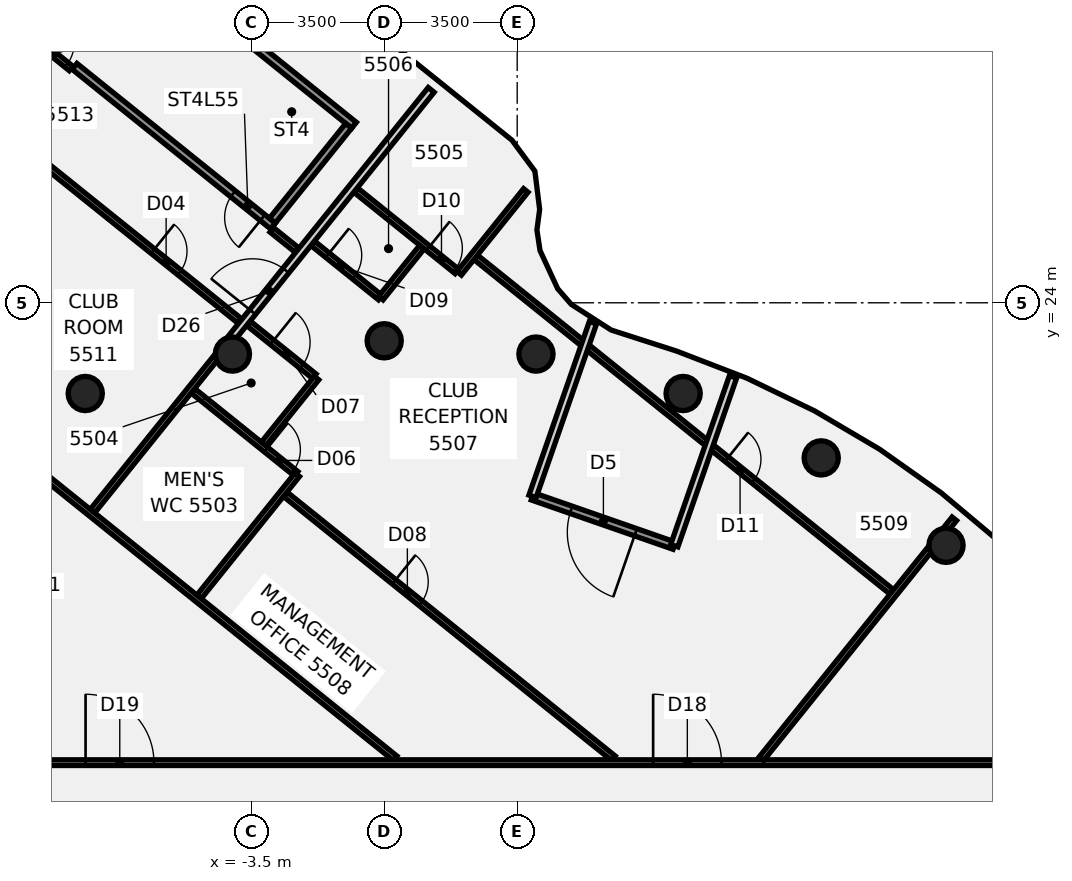
"""IFC4 building model, lengths in metres.
Left out: names, types, materials, properties, quantities, classifications, styles, units other than length and angle.
Written with IfcOpenShell. Run it as: python <this file> out.ifc"""

import sys

from ifc_helpers import new_model, si_unit, direction, frame, frame_2d, origin, origin_2d, place, context, subcontext, project, spatial, polyline, rectangle, circle, outline, extrude, element, fill, save


model = new_model("IFC4")
c1 = context("Model", 3, precision=1e-05, world=origin(), true_north=direction((0.0, 1.0)))
c2 = subcontext(c1, "Body", "Model", "MODEL_VIEW")
j1 = project(units=[si_unit("LENGTHUNIT", "METRE"), si_unit("PLANEANGLEUNIT", "RADIAN")], contexts=[c1])
p1 = place(None, origin())
s1 = spatial("IfcSite", under=j1, at=p1, CompositionType="ELEMENT")
p2 = place(p1, origin())
s2 = spatial("IfcBuilding", under=s1, at=p2, CompositionType="ELEMENT")
p3 = place(p2, frame((0.0, 0.0, 219.9)))
s3 = spatial("IfcBuildingStorey", under=s2, at=p3, CompositionType="ELEMENT", Elevation=219.9)
for number, where, z_axis, x_axis in (
    (1, (14.784, 17.619, -0.14), (0.0, 0.0, 1.0), (1.0, 0.0, 0.0)),
    (2, (11.5, 19.919, -0.14), (0.0, 0.0, 1.0), (1.0, 0.0, 0.0)),
    (3, (7.866, 21.613, -0.14), (0.0, 0.0, 1.0), (1.0, 0.0, 0.0)),
    (4, (3.994, 22.651, -0.14), (0.0, 0.0, 1.0), (1.0, 0.0, 0.0)),
    (5, (0.0, 23.0, -0.14), (0.0, 0.0, 1.0), (1.0, 0.0, 0.0)),
    (6, (-3.994, 22.651, -0.14), (0.0, 0.0, 1.0), (1.0, 0.0, 0.0)),
    (7, (-7.866, 21.613, -0.14), (0.0, 0.0, 1.0), (1.0, 0.0, 0.0)),
):
    element("IfcColumn", number, at=place(p3, frame(where, z_axis=z_axis, x_axis=x_axis)), inside=s3, PredefinedType="COLUMN", context=c2, shape_type="SweptSolid", body=[
        extrude(circle(Radius=0.45, at=origin_2d()), origin(), (0.0, 0.0, 1.0), 3.6),
    ])
p4 = place(p3, frame((-12.665, 22.432, 0.0), z_axis=(0.0, 0.0, 1.0), x_axis=(0.779284245227, -0.626670619338, 0.0)))
e8 = element("IfcWall", 8, at=p4, inside=s3, PredefinedType="PARTITIONING", context=c2, shape_type="SweptSolid", body=[
    extrude(rectangle(XDim=16.621, YDim=0.15, at=frame_2d((8.311, 0.0))), origin(), (0.0, 0.0, 1.0), 2.864),
])
p5 = place(p3, frame((-10.665, 29.036, 0.0), z_axis=(0.0, 0.0, 1.0), x_axis=(0.779529978914, -0.626364919176, 0.0)))
e9 = element("IfcWall", 9, at=p5, inside=s3, PredefinedType="PARTITIONING", context=c2, shape_type="SweptSolid", body=[
    extrude(rectangle(XDim=8.8, YDim=0.15, at=frame_2d((4.4, 0.0))), origin(), (0.0, 0.0, 1.0), 2.864),
])
p6 = place(p5, frame((5.87, 0.0, 0.0)))
e10 = element("IfcOpeningElement", 10, at=p6, cuts=e9, PredefinedType="OPENING", context=c2, shape_type="SweptSolid", body=[
    extrude(rectangle(XDim=0.9, YDim=2.1, at=frame_2d((0.45, 1.05))), frame((0.0, 0.085, 0.0), z_axis=(0.0, -1.0, 0.0), x_axis=(1.0, 0.0, 0.0)), (0.0, 0.0, 1.0), 0.17),
])
p7 = place(p3, frame((-9.161, 30.907, 0.0), z_axis=(0.0, 0.0, 1.0), x_axis=(0.779191494895, -0.626785939763, 0.0)))
e11 = element("IfcWall", 11, at=p7, inside=s3, PredefinedType="PARTITIONING", context=c2, shape_type="SweptSolid", body=[
    extrude(rectangle(XDim=1.181, YDim=0.15, at=frame_2d((0.59, 0.0))), origin(), (0.0, 0.0, 1.0), 2.864),
])
p8 = place(p7, frame((0.131, 0.0, 0.0)))
e12 = element("IfcOpeningElement", 12, at=p8, cuts=e11, PredefinedType="OPENING", context=c2, shape_type="SweptSolid", body=[
    extrude(rectangle(XDim=0.9, YDim=2.1, at=frame_2d((0.45, 1.05))), frame((0.0, 0.085, 0.0), z_axis=(0.0, -1.0, 0.0), x_axis=(1.0, 0.0, 0.0)), (0.0, 0.0, 1.0), 0.17),
])
p9 = place(p3, frame((-2.958, 25.918, 0.0), z_axis=(0.0, 0.0, 1.0), x_axis=(0.77922270064, -0.626747144235, 0.0)))
e13 = element("IfcWall", 13, at=p9, inside=s3, PredefinedType="PARTITIONING", context=c2, shape_type="SweptSolid", body=[
    extrude(rectangle(XDim=0.841, YDim=0.15, at=frame_2d((0.42, 0.0))), origin(), (0.0, 0.0, 1.0), 2.864),
])
p10 = place(p3, frame((-5.03, 21.682, 0.0), z_axis=(0.0, 0.0, 1.0), x_axis=(0.779278251962, -0.626678072074, 0.0)))
e14 = element("IfcWall", 14, at=p10, inside=s3, PredefinedType="PARTITIONING", context=c2, shape_type="SweptSolid", body=[
    extrude(rectangle(XDim=3.48, YDim=0.15, at=frame_2d((1.74, 0.0))), origin(), (0.0, 0.0, 1.0), 2.864),
])
p11 = place(p10, frame((2.47, 0.0, 0.0)))
e15 = element("IfcOpeningElement", 15, at=p11, cuts=e14, PredefinedType="OPENING", context=c2, shape_type="SweptSolid", body=[
    extrude(rectangle(XDim=0.9, YDim=2.1, at=frame_2d((0.45, 1.05))), frame((0.0, 0.085, 0.0), z_axis=(0.0, -1.0, 0.0), x_axis=(1.0, 0.0, 0.0)), (0.0, 0.0, 1.0), 0.17),
])
p12 = place(p3, frame((-3.558, 23.449, 0.0), z_axis=(0.0, 0.0, 1.0), x_axis=(0.779441374228, -0.626475174401, 0.0)))
e16 = element("IfcWall", 16, at=p12, inside=s3, PredefinedType="PARTITIONING", context=c2, shape_type="SweptSolid", body=[
    extrude(rectangle(XDim=2.206, YDim=0.15, at=frame_2d((1.103, 0.0))), origin(), (0.0, 0.0, 1.0), 2.864),
])
p13 = place(p12, frame((0.78, 0.0, 0.0)))
e17 = element("IfcOpeningElement", 17, at=p13, cuts=e16, PredefinedType="OPENING", context=c2, shape_type="SweptSolid", body=[
    extrude(rectangle(XDim=1.0, YDim=2.1, at=frame_2d((0.5, 1.05))), frame((0.0, 0.085, 0.0), z_axis=(0.0, -1.0, 0.0), x_axis=(1.0, 0.0, 0.0)), (0.0, 0.0, 1.0), 0.17),
])
p14 = place(p3, frame((-2.601, 18.959, 0.0), z_axis=(0.0, 0.0, 1.0), x_axis=(0.779260240467, -0.626700468826, 0.0)))
e18 = element("IfcWall", 18, at=p14, inside=s3, PredefinedType="PARTITIONING", context=c2, shape_type="SweptSolid", body=[
    extrude(rectangle(XDim=11.079, YDim=0.15, at=frame_2d((5.54, 0.0))), origin(), (0.0, 0.0, 1.0), 2.864),
])
p15 = place(p14, frame((3.67, 0.0, 0.0)))
e19 = element("IfcOpeningElement", 19, at=p15, cuts=e18, PredefinedType="OPENING", context=c2, shape_type="SweptSolid", body=[
    extrude(rectangle(XDim=0.9, YDim=2.1, at=frame_2d((0.45, 1.05))), frame((0.0, 0.085, 0.0), z_axis=(0.0, -1.0, 0.0), x_axis=(1.0, 0.0, 0.0)), (0.0, 0.0, 1.0), 0.17),
])
p16 = place(p3, frame((-1.881, 25.565, 0.0), z_axis=(0.0, 0.0, 1.0), x_axis=(0.779446392233, -0.626468931101, 0.0)))
e20 = element("IfcWall", 20, at=p16, inside=s3, PredefinedType="PARTITIONING", context=c2, shape_type="SweptSolid", body=[
    extrude(rectangle(XDim=2.281, YDim=0.15, at=frame_2d((1.14, 0.0))), origin(), (0.0, 0.0, 1.0), 2.864),
])
p17 = place(p16, frame((0.5, 0.0, 0.0)))
e21 = element("IfcOpeningElement", 21, at=p17, cuts=e20, PredefinedType="OPENING", context=c2, shape_type="SweptSolid", body=[
    extrude(rectangle(XDim=0.9, YDim=2.1, at=frame_2d((0.45, 1.05))), frame((0.0, 0.085, 0.0), z_axis=(0.0, -1.0, 0.0), x_axis=(1.0, 0.0, 0.0)), (0.0, 0.0, 1.0), 0.17),
])
p18 = place(p3, frame((-0.738, 26.956, 0.0), z_axis=(0.0, 0.0, 1.0), x_axis=(0.779423789997, -0.626497051539, 0.0)))
e22 = element("IfcWall", 22, at=p18, inside=s3, PredefinedType="PARTITIONING", context=c2, shape_type="SweptSolid", body=[
    extrude(rectangle(XDim=3.4, YDim=0.15, at=frame_2d((1.7, 0.0))), origin(), (0.0, 0.0, 1.0), 2.864),
])
p19 = place(p18, frame((2.43, 0.0, 0.0)))
e23 = element("IfcOpeningElement", 23, at=p19, cuts=e22, PredefinedType="OPENING", context=c2, shape_type="SweptSolid", body=[
    extrude(rectangle(XDim=0.9, YDim=2.1, at=frame_2d((0.45, 1.05))), frame((0.0, 0.085, 0.0), z_axis=(0.0, -1.0, 0.0), x_axis=(1.0, 0.0, 0.0)), (0.0, 0.0, 1.0), 0.17),
])
p20 = place(p3, frame((2.413, 25.192, 0.0), z_axis=(0.0, 0.0, 1.0), x_axis=(0.779312396621, -0.6266356106, 0.0)))
e24 = element("IfcWall", 24, at=p20, inside=s3, PredefinedType="PARTITIONING", context=c2, shape_type="SweptSolid", body=[
    extrude(rectangle(XDim=14.04, YDim=0.15, at=frame_2d((7.02, 0.0))), origin(), (0.0, 0.0, 1.0), 2.864),
])
p21 = place(p20, frame((8.47, 0.0, 0.0)))
e25 = element("IfcOpeningElement", 25, at=p21, cuts=e24, PredefinedType="OPENING", context=c2, shape_type="SweptSolid", body=[
    extrude(rectangle(XDim=0.9, YDim=2.1, at=frame_2d((0.45, 1.05))), frame((0.0, 0.085, 0.0), z_axis=(0.0, -1.0, 0.0), x_axis=(1.0, 0.0, 0.0)), (0.0, 0.0, 1.0), 0.17),
])
p22 = place(p3, frame((-17.065, 11.9, 0.0), z_axis=(0.0, 0.0, 1.0), x_axis=(1.0, 0.0, 0.0)))
e26 = element("IfcWall", 26, at=p22, inside=s3, PredefinedType="PARTITIONING", context=c2, shape_type="SweptSolid", body=[
    extrude(rectangle(XDim=34.165, YDim=0.15, at=frame_2d((17.083, 0.0))), origin(), (0.0, 0.0, 1.0), 2.864),
])
p23 = place(p22, frame((24.142, 0.0, 0.0)))
e27 = element("IfcOpeningElement", 27, at=p23, cuts=e26, PredefinedType="OPENING", context=c2, shape_type="SweptSolid", body=[
    extrude(rectangle(XDim=1.8, YDim=2.1, at=frame_2d((0.9, 1.05))), frame((0.0, 0.085, 0.0), z_axis=(0.0, -1.0, 0.0), x_axis=(1.0, 0.0, 0.0)), (0.0, 0.0, 1.0), 0.17),
])
p24 = place(p22, frame((9.207, 0.0, 0.0)))
e28 = element("IfcOpeningElement", 28, at=p24, cuts=e26, PredefinedType="OPENING", context=c2, shape_type="SweptSolid", body=[
    extrude(rectangle(XDim=1.8, YDim=2.1, at=frame_2d((0.9, 1.05))), frame((0.0, 0.085, 0.0), z_axis=(0.0, -1.0, 0.0), x_axis=(1.0, 0.0, 0.0)), (0.0, 0.0, 1.0), 0.17),
])
p25 = place(p22, frame((2.757, 0.0, 0.0)))
e29 = element("IfcOpeningElement", 29, at=p25, cuts=e26, PredefinedType="OPENING", context=c2, shape_type="SweptSolid", body=[
    extrude(rectangle(XDim=1.8, YDim=2.1, at=frame_2d((0.9, 1.05))), frame((0.0, 0.085, 0.0), z_axis=(0.0, -1.0, 0.0), x_axis=(1.0, 0.0, 0.0)), (0.0, 0.0, 1.0), 0.17),
])
p26 = place(p3, frame((-14.188, 24.782, 0.0), z_axis=(0.0, 0.0, 1.0), x_axis=(0.626733675184, 0.779233533923, 0.0)))
e30 = element("IfcWall", 30, at=p26, inside=s3, PredefinedType="PARTITIONING", context=c2, shape_type="SweptSolid", body=[
    extrude(rectangle(XDim=13.422, YDim=0.15, at=frame_2d((6.711, 0.0))), origin(), (0.0, 0.0, 1.0), 2.864),
])
p27 = place(p26, frame((5.823, 0.0, 0.0)))
e31 = element("IfcOpeningElement", 31, at=p27, cuts=e30, PredefinedType="OPENING", context=c2, shape_type="SweptSolid", body=[
    extrude(rectangle(XDim=1.8, YDim=2.1, at=frame_2d((0.9, 1.05))), frame((0.0, 0.085, 0.0), z_axis=(0.0, -1.0, 0.0), x_axis=(1.0, 0.0, 0.0)), (0.0, 0.0, 1.0), 0.17),
])
p28 = place(p3, frame((-7.674, 18.521, 0.0), z_axis=(0.0, 0.0, 1.0), x_axis=(0.626662098772, 0.779291097064, 0.0)))
e32 = element("IfcWall", 32, at=p28, inside=s3, PredefinedType="PARTITIONING", context=c2, shape_type="SweptSolid", body=[
    extrude(rectangle(XDim=5.307, YDim=0.15, at=frame_2d((2.654, 0.0))), origin(), (0.0, 0.0, 1.0), 2.864),
])
p29 = place(p3, frame((-4.066, 23.008, 0.0), z_axis=(0.0, 0.0, 1.0), x_axis=(0.62666000118, 0.779292783824, 0.0)))
e33 = element("IfcWall", 33, at=p29, inside=s3, PredefinedType="PARTITIONING", context=c2, shape_type="SweptSolid", body=[
    extrude(rectangle(XDim=8.461, YDim=0.2, at=frame_2d((4.231, 0.0))), origin(), (0.0, 0.0, 1.0), 2.864),
])
p30 = place(p29, frame((0.962, 0.0, 0.0)))
e34 = element("IfcOpeningElement", 34, at=p30, cuts=e33, PredefinedType="OPENING", context=c2, shape_type="SweptSolid", body=[
    extrude(rectangle(XDim=1.4, YDim=2.1, at=frame_2d((0.7, 1.05))), frame((0.0, 0.11, 0.0), z_axis=(0.0, -1.0, 0.0), x_axis=(1.0, 0.0, 0.0)), (0.0, 0.0, 1.0), 0.22),
])
p31 = place(p3, frame((-4.869, 16.265, 0.0), z_axis=(0.0, 0.0, 1.0), x_axis=(0.626586553854, 0.779351840012, 0.0)))
e35 = element("IfcWall", 35, at=p31, inside=s3, PredefinedType="PARTITIONING", context=c2, shape_type="SweptSolid", body=[
    extrude(rectangle(XDim=4.12, YDim=0.15, at=frame_2d((2.06, 0.0))), origin(), (0.0, 0.0, 1.0), 2.864),
])
p32 = place(p3, frame((1.974, 24.776, 0.0), z_axis=(0.0, 0.0, 1.0), x_axis=(0.626641118129, 0.779307968053, 0.0)))
e36 = element("IfcWall", 36, at=p32, inside=s3, PredefinedType="PARTITIONING", context=c2, shape_type="SweptSolid", body=[
    extrude(rectangle(XDim=2.797, YDim=0.15, at=frame_2d((1.398, 0.0))), origin(), (0.0, 0.0, 1.0), 2.864),
])
p33 = place(p3, frame((-3.172, 20.29, 0.0), z_axis=(0.0, 0.0, 1.0), x_axis=(0.626905231465, 0.779095520949, 0.0)))
e37 = element("IfcWall", 37, at=p33, inside=s3, PredefinedType="PARTITIONING", context=c2, shape_type="SweptSolid", body=[
    extrude(rectangle(XDim=2.22, YDim=0.15, at=frame_2d((1.11, 0.0))), origin(), (0.0, 0.0, 1.0), 2.864),
])
p34 = place(p3, frame((-0.087, 24.124, 0.0), z_axis=(0.0, 0.0, 1.0), x_axis=(0.62701150586, 0.779009994492, 0.0)))
e38 = element("IfcWall", 38, at=p34, inside=s3, PredefinedType="PARTITIONING", context=c2, shape_type="SweptSolid", body=[
    extrude(rectangle(XDim=1.72, YDim=0.15, at=frame_2d((0.86, 0.0))), origin(), (0.0, 0.0, 1.0), 2.864),
])
p35 = place(p3, frame((9.927, 12.005, 0.0), z_axis=(0.0, 0.0, 1.0), x_axis=(0.626707997456, 0.779254185696, 0.0)))
e39 = element("IfcWall", 39, at=p35, inside=s3, PredefinedType="PARTITIONING", context=c2, shape_type="SweptSolid", body=[
    extrude(rectangle(XDim=7.063, YDim=0.15, at=frame_2d((3.531, 0.0))), origin(), (0.0, 0.0, 1.0), 2.864),
])
p36 = place(p3, frame((14.807, 18.073, 0.0), z_axis=(0.0, 0.0, 1.0), x_axis=(0.626696680014, 0.779263287509, 0.0)))
e40 = element("IfcWall", 40, at=p36, inside=s3, PredefinedType="PARTITIONING", context=c2, shape_type="SweptSolid", body=[
    extrude(rectangle(XDim=0.312, YDim=0.15, at=frame_2d((0.156, 0.0))), origin(), (0.0, 0.0, 1.0), 2.864),
])
p37 = place(p3, frame((7.634, 17.608, 0.0), z_axis=(0.0, 0.0, 1.0), x_axis=(-0.944480118934, 0.328568569613, 0.0)))
e41 = element("IfcWall", 41, at=p37, inside=s3, PredefinedType="SOLIDWALL", context=c2, shape_type="SweptSolid", body=[
    extrude(rectangle(XDim=3.95, YDim=0.2, at=frame_2d((1.975, 0.0))), origin(), (0.0, 0.0, 1.0), 2.964),
])
p38 = place(p37, frame((1.075, 0.0, 0.0)))
e42 = element("IfcOpeningElement", 42, at=p38, cuts=e41, PredefinedType="OPENING", context=c2, shape_type="SweptSolid", body=[
    extrude(rectangle(XDim=1.8, YDim=2.4, at=frame_2d((0.9, 1.2))), frame((0.0, 0.11, 0.0), z_axis=(0.0, -1.0, 0.0), x_axis=(1.0, 0.0, 0.0)), (0.0, 0.0, 1.0), 0.22),
])
p39 = place(p3, frame((7.634, 17.608, 0.0), z_axis=(0.0, 0.0, 1.0), x_axis=(0.328583047261, 0.944475082283, 0.0)))
e43 = element("IfcWall", 43, at=p39, inside=s3, PredefinedType="SOLIDWALL", context=c2, shape_type="SweptSolid", body=[
    extrude(rectangle(XDim=4.702, YDim=0.2, at=frame_2d((2.351, 0.0))), origin(), (0.0, 0.0, 1.0), 3.46),
])
p40 = place(p3, frame((3.903, 18.906, 0.0), z_axis=(0.0, 0.0, 1.0), x_axis=(0.328583250144, 0.9444750117, 0.0)))
e44 = element("IfcWall", 44, at=p40, inside=s3, PredefinedType="SOLIDWALL", context=c2, shape_type="SweptSolid", body=[
    extrude(rectangle(XDim=4.838, YDim=0.2, at=frame_2d((2.419, 0.0))), origin(), (0.0, 0.0, 1.0), 2.964),
])
p41 = place(p3, frame((-2.926, 26.021, -0.14), z_axis=(0.0, 0.0, 1.0), x_axis=(-0.779295070633, 0.626657157373, 0.0)))
e45 = element("IfcWall", 45, at=p41, inside=s3, PredefinedType="SHEAR", context=c2, shape_type="SweptSolid", body=[
    extrude(rectangle(XDim=6.7, YDim=0.2, at=frame_2d((3.35, 0.0))), origin(), (0.0, 0.0, 1.0), 3.004),
])
p42 = place(p41, frame((0.35, 0.0, 0.0)))
e46 = element("IfcOpeningElement", 46, at=p42, cuts=e45, PredefinedType="OPENING", context=c2, shape_type="SweptSolid", body=[
    extrude(rectangle(XDim=1.0, YDim=2.1, at=frame_2d((0.5, 1.05))), frame((0.0, 0.11, 0.0), z_axis=(0.0, -1.0, 0.0), x_axis=(1.0, 0.0, 0.0)), (0.0, 0.0, 1.0), 0.22),
])
p43 = place(p3, frame((-0.795, 28.671, -0.14), z_axis=(0.0, 0.0, 1.0), x_axis=(-0.779280760932, 0.626674952142, 0.0)))
e47 = element("IfcWall", 47, at=p43, inside=s3, PredefinedType="SHEAR", context=c2, shape_type="SweptSolid", body=[
    extrude(rectangle(XDim=6.7, YDim=0.2, at=frame_2d((3.35, 0.0))), origin(), (0.0, 0.0, 1.0), 3.004),
])
p44 = place(p3, frame((-0.936, 28.656, -0.14), z_axis=(0.0, 0.0, 1.0), x_axis=(-0.626646862977, -0.779303348589, 0.0)))
e48 = element("IfcWall", 48, at=p44, inside=s3, PredefinedType="SHEAR", context=c2, shape_type="SweptSolid", body=[
    extrude(rectangle(XDim=3.2, YDim=0.2, at=frame_2d((1.6, 0.0))), origin(), (0.0, 0.0, 1.0), 3.6),
])
p45 = place(p3, frame((0.0, 0.0, -0.14)))
e49 = element("IfcWall", 49, at=p45, inside=s3, PredefinedType="SHEAR", context=c2, shape_type="SweptSolid", body=[
    extrude(outline(polyline([(-5.923, 32.666), (-6.079, 32.792), (-8.084, 30.298), (-7.929, 30.172), (-5.923, 32.666)])), origin(), (0.0, 0.0, 1.0), 3.004),
])
p46 = place(p6, frame((0.9, 0.0, 0.0), z_axis=(0.0, 0.0, 1.0), x_axis=(-1.0, 0.0, 0.0)))
e50 = element("IfcDoor", 50, at=p46, inside=s3, OperationType="SINGLE_SWING_RIGHT", PredefinedType="DOOR", context=c2, shape_type="SweptSolid", body=[
    extrude(rectangle(XDim=0.9, YDim=2.1, at=frame_2d((0.45, 1.05))), frame((0.0, 0.025, 0.0), z_axis=(0.0, -1.0, 0.0), x_axis=(1.0, 0.0, 0.0)), (0.0, 0.0, 1.0), 0.05),
])
fill(e10, e50)
p47 = place(p8, origin())
e51 = element("IfcDoor", 51, at=p47, inside=s3, OperationType="SINGLE_SWING_RIGHT", PredefinedType="DOOR", context=c2, shape_type="SweptSolid", body=[
    extrude(rectangle(XDim=0.9, YDim=2.1, at=frame_2d((0.45, 1.05))), frame((0.0, 0.025, 0.0), z_axis=(0.0, -1.0, 0.0), x_axis=(1.0, 0.0, 0.0)), (0.0, 0.0, 1.0), 0.05),
])
fill(e12, e51)
p48 = place(p11, frame((0.9, 0.0, 0.0), z_axis=(0.0, 0.0, 1.0), x_axis=(-1.0, 0.0, 0.0)))
e52 = element("IfcDoor", 52, at=p48, inside=s3, OperationType="SINGLE_SWING_RIGHT", PredefinedType="DOOR", context=c2, shape_type="SweptSolid", body=[
    extrude(rectangle(XDim=0.9, YDim=2.1, at=frame_2d((0.45, 1.05))), frame((0.0, 0.025, 0.0), z_axis=(0.0, -1.0, 0.0), x_axis=(1.0, 0.0, 0.0)), (0.0, 0.0, 1.0), 0.05),
])
fill(e15, e52)
p49 = place(p13, frame((1.0, 0.0, 0.0), z_axis=(0.0, 0.0, 1.0), x_axis=(-1.0, 0.0, 0.0)))
e53 = element("IfcDoor", 53, at=p49, inside=s3, OperationType="SINGLE_SWING_RIGHT", PredefinedType="DOOR", context=c2, shape_type="SweptSolid", body=[
    extrude(rectangle(XDim=1.0, YDim=2.1, at=frame_2d((0.5, 1.05))), frame((0.0, 0.025, 0.0), z_axis=(0.0, -1.0, 0.0), x_axis=(1.0, 0.0, 0.0)), (0.0, 0.0, 1.0), 0.05),
])
fill(e17, e53)
p50 = place(p15, frame((0.9, 0.0, 0.0), z_axis=(0.0, 0.0, 1.0), x_axis=(-1.0, 0.0, 0.0)))
e54 = element("IfcDoor", 54, at=p50, inside=s3, OperationType="SINGLE_SWING_LEFT", PredefinedType="DOOR", context=c2, shape_type="SweptSolid", body=[
    extrude(rectangle(XDim=0.9, YDim=2.1, at=frame_2d((0.45, 1.05))), frame((0.0, 0.025, 0.0), z_axis=(0.0, -1.0, 0.0), x_axis=(1.0, 0.0, 0.0)), (0.0, 0.0, 1.0), 0.05),
])
fill(e19, e54)
p51 = place(p17, origin())
e55 = element("IfcDoor", 55, at=p51, inside=s3, OperationType="SINGLE_SWING_RIGHT", PredefinedType="DOOR", context=c2, shape_type="SweptSolid", body=[
    extrude(rectangle(XDim=0.9, YDim=2.1, at=frame_2d((0.45, 1.05))), frame((0.0, 0.025, 0.0), z_axis=(0.0, -1.0, 0.0), x_axis=(1.0, 0.0, 0.0)), (0.0, 0.0, 1.0), 0.05),
])
fill(e21, e55)
p52 = place(p19, origin())
e56 = element("IfcDoor", 56, at=p52, inside=s3, OperationType="SINGLE_SWING_LEFT", PredefinedType="DOOR", context=c2, shape_type="SweptSolid", body=[
    extrude(rectangle(XDim=0.9, YDim=2.1, at=frame_2d((0.45, 1.05))), frame((0.0, 0.025, 0.0), z_axis=(0.0, -1.0, 0.0), x_axis=(1.0, 0.0, 0.0)), (0.0, 0.0, 1.0), 0.05),
])
fill(e23, e56)
p53 = place(p21, origin())
e57 = element("IfcDoor", 57, at=p53, inside=s3, OperationType="SINGLE_SWING_LEFT", PredefinedType="DOOR", context=c2, shape_type="SweptSolid", body=[
    extrude(rectangle(XDim=0.9, YDim=2.1, at=frame_2d((0.45, 1.05))), frame((0.0, 0.025, 0.0), z_axis=(0.0, -1.0, 0.0), x_axis=(1.0, 0.0, 0.0)), (0.0, 0.0, 1.0), 0.05),
])
fill(e25, e57)
p54 = place(p23, frame((1.8, 0.0, 0.0), z_axis=(0.0, 0.0, 1.0), x_axis=(-1.0, 0.0, 0.0)))
e58 = element("IfcDoor", 58, at=p54, inside=s3, OperationType="DOUBLE_DOOR_SINGLE_SWING", PredefinedType="DOOR", context=c2, shape_type="SweptSolid", body=[
    extrude(rectangle(XDim=1.8, YDim=2.1, at=frame_2d((0.9, 1.05))), frame((0.0, 0.025, 0.0), z_axis=(0.0, -1.0, 0.0), x_axis=(1.0, 0.0, 0.0)), (0.0, 0.0, 1.0), 0.05),
])
fill(e27, e58)
p55 = place(p24, origin())
e59 = element("IfcDoor", 59, at=p55, inside=s3, OperationType="DOUBLE_DOOR_SINGLE_SWING", PredefinedType="DOOR", context=c2, shape_type="SweptSolid", body=[
    extrude(rectangle(XDim=1.8, YDim=2.1, at=frame_2d((0.9, 1.05))), frame((0.0, 0.025, 0.0), z_axis=(0.0, -1.0, 0.0), x_axis=(1.0, 0.0, 0.0)), (0.0, 0.0, 1.0), 0.05),
])
fill(e28, e59)
p56 = place(p30, frame((1.4, 0.0, 0.0), z_axis=(0.0, 0.0, 1.0), x_axis=(-1.0, 0.0, 0.0)))
e60 = element("IfcDoor", 60, at=p56, inside=s3, OperationType="DOUBLE_DOOR_SINGLE_SWING", PredefinedType="DOOR", context=c2, shape_type="SweptSolid", body=[
    extrude(rectangle(XDim=1.4, YDim=2.1, at=frame_2d((0.7, 1.05))), frame((0.0, 0.025, 0.0), z_axis=(0.0, -1.0, 0.0), x_axis=(1.0, 0.0, 0.0)), (0.0, 0.0, 1.0), 0.05),
])
fill(e34, e60)
p57 = place(p38, origin())
e61 = element("IfcDoor", 61, at=p57, inside=s3, OperationType="SINGLE_SWING_LEFT", PredefinedType="DOOR", context=c2, shape_type="SweptSolid", body=[
    extrude(rectangle(XDim=1.8, YDim=2.4, at=frame_2d((0.9, 1.2))), frame((0.0, 0.025, 0.0), z_axis=(0.0, -1.0, 0.0), x_axis=(1.0, 0.0, 0.0)), (0.0, 0.0, 1.0), 0.05),
])
fill(e42, e61)
p58 = place(p42, origin())
e62 = element("IfcDoor", 62, at=p58, inside=s3, OperationType="SINGLE_SWING_LEFT", PredefinedType="DOOR", context=c2, shape_type="SweptSolid", body=[
    extrude(rectangle(XDim=1.0, YDim=2.1, at=frame_2d((0.5, 1.05))), frame((0.0, 0.025, 0.0), z_axis=(0.0, -1.0, 0.0), x_axis=(1.0, 0.0, 0.0)), (0.0, 0.0, 1.0), 0.05),
])
fill(e46, e62)
save(model, sys.argv[1])
